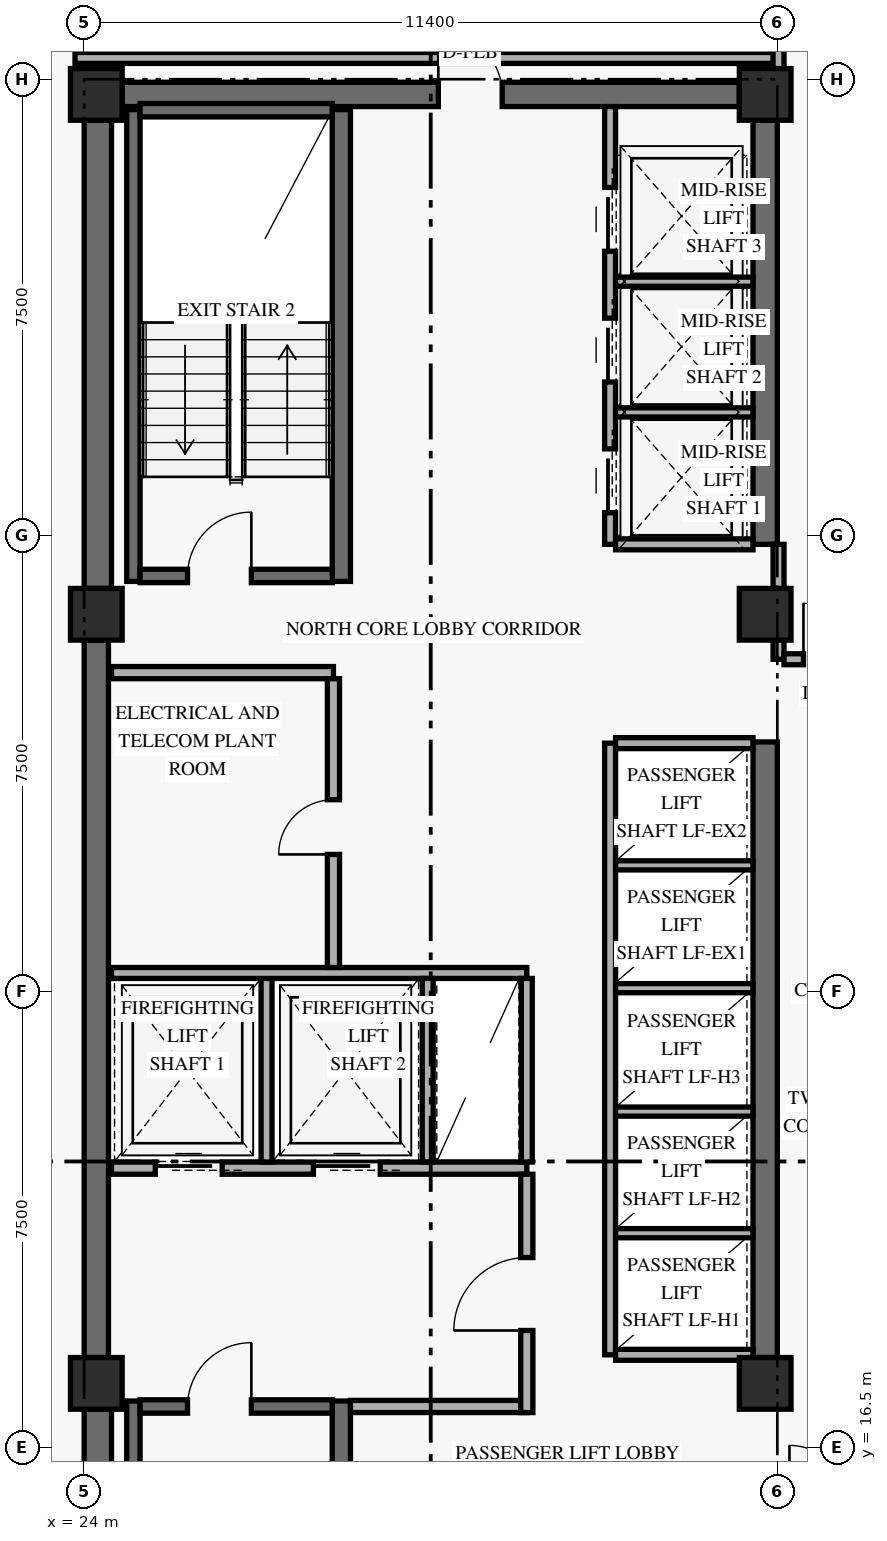
"""IFC4 building model, lengths in metres.
Left out: names, types, materials, properties, quantities, classifications, styles, units other than length and angle.
Written with IfcOpenShell. Run it as: python <this file> out.ifc"""

import sys

from ifc_helpers import new_model, si_unit, direction, frame, frame_2d, origin, origin_2d, place, context, subcontext, project, spatial, rectangle, extrude, element, fill, save


model = new_model("IFC4")
c1 = context("Model", 3, precision=1e-05, world=origin(), true_north=direction((0.0, 1.0)))
c2 = subcontext(c1, "Body", "Model", "MODEL_VIEW")
j1 = project(units=[si_unit("LENGTHUNIT", "METRE"), si_unit("PLANEANGLEUNIT", "RADIAN")], contexts=[c1])
p1 = place(None, origin())
s1 = spatial("IfcSite", under=j1, at=p1, CompositionType="ELEMENT")
p2 = place(p1, origin())
s2 = spatial("IfcBuilding", under=s1, at=p2, CompositionType="ELEMENT")
p3 = place(p2, frame((0.0, 0.0, 128.4)))
s3 = spatial("IfcBuildingStorey", under=s2, at=p3, CompositionType="ELEMENT", Elevation=128.4)
p4 = place(p3, frame((24.225, 9.675, 0.0), z_axis=(0.0, 0.0, 1.0), x_axis=(0.0, 1.0, 0.0)))
e1 = element("IfcWall", 1, at=p4, inside=s3, PredefinedType="SHEAR", context=c2, shape_type="SweptSolid", body=[
    extrude(rectangle(XDim=7.45, YDim=0.45, at=frame_2d((3.725, 0.0))), origin(), (0.0, 0.0, 1.0), 2.749),
])
p5 = place(p3, frame((24.2, 17.975, 0.0), z_axis=(0.0, 0.0, 1.0), x_axis=(0.0, 1.0, 0.0)))
e2 = element("IfcWall", 2, at=p5, inside=s3, PredefinedType="SHEAR", context=c2, shape_type="SweptSolid", body=[
    extrude(rectangle(XDim=11.8, YDim=0.4, at=frame_2d((5.9, 0.0))), origin(), (0.0, 0.0, 1.0), 2.749),
])
p6 = place(p3, frame((24.225, 30.625, 0.0), z_axis=(0.0, 0.0, 1.0), x_axis=(0.0, 1.0, 0.0)))
e3 = element("IfcWall", 3, at=p6, inside=s3, PredefinedType="SHEAR", context=c2, shape_type="SweptSolid", body=[
    extrude(rectangle(XDim=7.7, YDim=0.45, at=frame_2d((3.85, 0.0))), origin(), (0.0, 0.0, 1.0), 2.749),
])
p7 = place(p3, frame((35.2, 17.975, 0.0), z_axis=(0.0, 0.0, 1.0), x_axis=(0.0, 1.0, 0.0)))
e4 = element("IfcWall", 4, at=p7, inside=s3, PredefinedType="SHEAR", context=c2, shape_type="SweptSolid", body=[
    extrude(rectangle(XDim=10.125, YDim=0.4, at=frame_2d((5.062, 0.0))), origin(), (0.0, 0.0, 1.0), 2.749),
])
p8 = place(p3, frame((35.2, 31.35, 0.0), z_axis=(0.0, 0.0, 1.0), x_axis=(0.0, 1.0, 0.0)))
e5 = element("IfcWall", 5, at=p8, inside=s3, PredefinedType="SHEAR", context=c2, shape_type="SweptSolid", body=[
    extrude(rectangle(XDim=6.975, YDim=0.4, at=frame_2d((3.487, 0.0))), origin(), (0.0, 0.0, 1.0), 2.749),
])
p9 = place(p3, frame((24.625, 38.75, 0.0), z_axis=(0.0, 0.0, 1.0), x_axis=(1.0, 0.0, 0.0)))
e6 = element("IfcWall", 6, at=p9, inside=s3, PredefinedType="SHEAR", context=c2, shape_type="SweptSolid", body=[
    extrude(rectangle(XDim=10.15, YDim=0.4, at=frame_2d((5.075, 0.0))), origin(), (0.0, 0.0, 1.0), 3.36),
])
p10 = place(p9, frame((5.2, 0.0, 0.0)))
e7 = element("IfcOpeningElement", 7, at=p10, cuts=e6, PredefinedType="OPENING", context=c2, shape_type="SweptSolid", body=[
    extrude(rectangle(XDim=1.05, YDim=2.15, at=frame_2d((0.525, 1.075))), frame((0.0, 0.21, 0.0), z_axis=(0.0, -1.0, 0.0), x_axis=(1.0, 0.0, 0.0)), (0.0, 0.0, 1.0), 0.42),
])
p11 = place(p3, frame((24.81, 9.5, 0.0), z_axis=(0.0, 0.0, 1.0), x_axis=(0.0, 1.0, 0.0)))
e8 = element("IfcWall", 8, at=p11, inside=s3, PredefinedType="SHEAR", context=c2, shape_type="SweptSolid", body=[
    extrude(rectangle(XDim=7.76, YDim=0.22, at=frame_2d((3.88, 0.0))), origin(), (0.0, 0.0, 1.0), 3.36),
])
p12 = place(p3, frame((28.23, 9.5, 0.0), z_axis=(0.0, 0.0, 1.0), x_axis=(0.0, 1.0, 0.0)))
e9 = element("IfcWall", 9, at=p12, inside=s3, PredefinedType="SHEAR", context=c2, shape_type="SweptSolid", body=[
    extrude(rectangle(XDim=7.76, YDim=0.3, at=frame_2d((3.88, 0.0))), origin(), (0.0, 0.0, 1.0), 3.36),
])
p13 = place(p3, frame((24.92, 17.17, 0.0), z_axis=(0.0, 0.0, 1.0), x_axis=(1.0, 0.0, 0.0)))
e10 = element("IfcWall", 10, at=p13, inside=s3, PredefinedType="SHEAR", context=c2, shape_type="SweptSolid", body=[
    extrude(rectangle(XDim=3.16, YDim=0.22, at=frame_2d((1.58, 0.0))), origin(), (0.0, 0.0, 1.0), 3.36),
])
p14 = place(p13, frame((0.78, 0.0, 0.0)))
e11 = element("IfcOpeningElement", 11, at=p14, cuts=e10, PredefinedType="OPENING", context=c2, shape_type="SweptSolid", body=[
    extrude(rectangle(XDim=1.05, YDim=2.15, at=frame_2d((0.525, 1.075))), frame((0.0, 0.12, 0.0), z_axis=(0.0, -1.0, 0.0), x_axis=(1.0, 0.0, 0.0)), (0.0, 0.0, 1.0), 0.24),
])
p15 = place(p3, frame((24.81, 30.74, 0.0), z_axis=(0.0, 0.0, 1.0), x_axis=(0.0, 1.0, 0.0)))
e12 = element("IfcWall", 12, at=p15, inside=s3, PredefinedType="SHEAR", context=c2, shape_type="SweptSolid", body=[
    extrude(rectangle(XDim=7.76, YDim=0.22, at=frame_2d((3.88, 0.0))), origin(), (0.0, 0.0, 1.0), 3.36),
])
p16 = place(p3, frame((28.23, 30.74, 0.0), z_axis=(0.0, 0.0, 1.0), x_axis=(0.0, 1.0, 0.0)))
e13 = element("IfcWall", 13, at=p16, inside=s3, PredefinedType="SHEAR", context=c2, shape_type="SweptSolid", body=[
    extrude(rectangle(XDim=7.76, YDim=0.3, at=frame_2d((3.88, 0.0))), origin(), (0.0, 0.0, 1.0), 3.36),
])
p17 = place(p3, frame((24.92, 30.83, 0.0), z_axis=(0.0, 0.0, 1.0), x_axis=(1.0, 0.0, 0.0)))
e14 = element("IfcWall", 14, at=p17, inside=s3, PredefinedType="SHEAR", context=c2, shape_type="SweptSolid", body=[
    extrude(rectangle(XDim=3.16, YDim=0.22, at=frame_2d((1.58, 0.0))), origin(), (0.0, 0.0, 1.0), 3.36),
])
p18 = place(p17, frame((0.78, 0.0, 0.0)))
e15 = element("IfcOpeningElement", 15, at=p18, cuts=e14, PredefinedType="OPENING", context=c2, shape_type="SweptSolid", body=[
    extrude(rectangle(XDim=1.05, YDim=2.15, at=frame_2d((0.525, 1.075))), frame((0.0, 0.12, 0.0), z_axis=(0.0, -1.0, 0.0), x_axis=(1.0, 0.0, 0.0)), (0.0, 0.0, 1.0), 0.24),
])
p19 = place(p3, frame((24.92, 38.49, 0.0), z_axis=(0.0, 0.0, 1.0), x_axis=(1.0, 0.0, 0.0)))
e16 = element("IfcWall", 16, at=p19, inside=s3, PredefinedType="SHEAR", context=c2, shape_type="SweptSolid", body=[
    extrude(rectangle(XDim=3.16, YDim=0.22, at=frame_2d((1.58, 0.0))), origin(), (0.0, 0.0, 1.0), 3.36),
])
for number, where, z_axis, x_axis in (
    (17, (24.2, 17.55, 0.0), (0.0, 0.0, 1.0), (1.0, 0.0, 0.0)),
    (18, (24.2, 30.2, 0.0), (0.0, 0.0, 1.0), (1.0, 0.0, 0.0)),
    (19, (24.2, 38.75, 0.0), (0.0, 0.0, 1.0), (1.0, 0.0, 0.0)),
    (20, (35.2, 17.55, 0.0), (0.0, 0.0, 1.0), (1.0, 0.0, 0.0)),
    (21, (35.2, 30.2, 0.0), (0.0, 0.0, 1.0), (1.0, 0.0, 0.0)),
    (22, (35.2, 38.75, 0.0), (0.0, 0.0, 1.0), (1.0, 0.0, 0.0)),
):
    element("IfcColumn", number, at=place(p3, frame(where, z_axis=z_axis, x_axis=x_axis)), inside=s3, PredefinedType="COLUMN", context=c2, shape_type="SweptSolid", body=[
        extrude(rectangle(XDim=0.85, YDim=0.85, at=origin_2d()), origin(), (0.0, 0.0, 1.0), 3.6),
    ])
p20 = place(p3, frame((24.45, 21.09, 0.0), z_axis=(0.0, 0.0, 1.0), x_axis=(1.0, 0.0, 0.0)))
e23 = element("IfcWall", 23, at=p20, inside=s3, PredefinedType="STANDARD", context=c2, shape_type="SweptSolid", body=[
    extrude(rectangle(XDim=6.83, YDim=0.2, at=frame_2d((3.415, 0.0))), origin(), (0.0, 0.0, 1.0), 3.36),
])
p21 = place(p20, frame((0.72, 0.0, 0.0)))
e24 = element("IfcOpeningElement", 24, at=p21, cuts=e23, PredefinedType="OPENING", context=c2, shape_type="SweptSolid", body=[
    extrude(rectangle(XDim=1.1, YDim=2.2, at=frame_2d((0.55, 1.1))), frame((0.0, 0.11, 0.0), z_axis=(0.0, -1.0, 0.0), x_axis=(1.0, 0.0, 0.0)), (0.0, 0.0, 1.0), 0.22),
])
p22 = place(p20, frame((3.32, 0.0, 0.0)))
e25 = element("IfcOpeningElement", 25, at=p22, cuts=e23, PredefinedType="OPENING", context=c2, shape_type="SweptSolid", body=[
    extrude(rectangle(XDim=1.1, YDim=2.2, at=frame_2d((0.55, 1.1))), frame((0.0, 0.11, 0.0), z_axis=(0.0, -1.0, 0.0), x_axis=(1.0, 0.0, 0.0)), (0.0, 0.0, 1.0), 0.22),
])
p23 = place(p3, frame((28.38, 17.17, 0.0), z_axis=(0.0, 0.0, 1.0), x_axis=(1.0, 0.0, 0.0)))
e26 = element("IfcWall", 26, at=p23, inside=s3, PredefinedType="STANDARD", context=c2, shape_type="SweptSolid", body=[
    extrude(rectangle(XDim=2.9, YDim=0.2, at=frame_2d((1.45, 0.0))), origin(), (0.0, 0.0, 1.0), 3.36),
])
p24 = place(p3, frame((31.28, 17.07, 0.0), z_axis=(0.0, 0.0, 1.0), x_axis=(0.0, 1.0, 0.0)))
e27 = element("IfcWall", 27, at=p24, inside=s3, PredefinedType="STANDARD", context=c2, shape_type="SweptSolid", body=[
    extrude(rectangle(XDim=3.92, YDim=0.2, at=frame_2d((1.96, 0.0))), origin(), (0.0, 0.0, 1.0), 2.731),
])
p25 = place(p24, frame((1.35, 0.0, 0.0)))
e28 = element("IfcOpeningElement", 28, at=p25, cuts=e27, PredefinedType="OPENING", context=c2, shape_type="SweptSolid", body=[
    extrude(rectangle(XDim=1.2, YDim=2.15, at=frame_2d((0.6, 1.075))), frame((0.0, 0.11, 0.0), z_axis=(0.0, -1.0, 0.0), x_axis=(1.0, 0.0, 0.0)), (0.0, 0.0, 1.0), 0.22),
])
p26 = place(p3, frame((27.0, 21.19, 0.0), z_axis=(0.0, 0.0, 1.0), x_axis=(0.0, 1.0, 0.0)))
e29 = element("IfcWall", 29, at=p26, inside=s3, PredefinedType="STANDARD", context=c2, shape_type="SweptSolid", body=[
    extrude(rectangle(XDim=3.11, YDim=0.18, at=frame_2d((1.555, 0.0))), origin(), (0.0, 0.0, 1.0), 3.36),
])
p27 = place(p3, frame((24.45, 24.3, 0.0), z_axis=(0.0, 0.0, 1.0), x_axis=(1.0, 0.0, 0.0)))
e30 = element("IfcWall", 30, at=p27, inside=s3, PredefinedType="STANDARD", context=c2, shape_type="SweptSolid", body=[
    extrude(rectangle(XDim=6.83, YDim=0.18, at=frame_2d((3.415, 0.0))), origin(), (0.0, 0.0, 1.0), 3.36),
])
for number, where, z_axis, x_axis in (
    (31, (29.65, 21.19, 0.0), (0.0, 0.0, 1.0), (0.0, 1.0, 0.0)),
    (32, (31.28, 21.19, 0.0), (0.0, 0.0, 1.0), (0.0, 1.0, 0.0)),
):
    element("IfcWall", number, at=place(p3, frame(where, z_axis=z_axis, x_axis=x_axis)), inside=s3, PredefinedType="STANDARD", context=c2, shape_type="SweptSolid", body=[
        extrude(rectangle(XDim=3.02, YDim=0.18, at=frame_2d((1.51, 0.0))), origin(), (0.0, 0.0, 1.0), 3.36),
    ])
p28 = place(p3, frame((24.45, 29.24, 0.0), z_axis=(0.0, 0.0, 1.0), x_axis=(1.0, 0.0, 0.0)))
e33 = element("IfcWall", 33, at=p28, inside=s3, PredefinedType="STANDARD", context=c2, shape_type="SweptSolid", body=[
    extrude(rectangle(XDim=3.65, YDim=0.2, at=frame_2d((1.825, 0.0))), origin(), (0.0, 0.0, 1.0), 3.36),
])
p29 = place(p3, frame((28.1, 24.39, 0.0), z_axis=(0.0, 0.0, 1.0), x_axis=(0.0, 1.0, 0.0)))
e34 = element("IfcWall", 34, at=p29, inside=s3, PredefinedType="STANDARD", context=c2, shape_type="SweptSolid", body=[
    extrude(rectangle(XDim=4.75, YDim=0.2, at=frame_2d((2.375, 0.0))), origin(), (0.0, 0.0, 1.0), 3.36),
])
p30 = place(p29, frame((1.86, 0.0, 0.0)))
e35 = element("IfcOpeningElement", 35, at=p30, cuts=e34, PredefinedType="OPENING", context=c2, shape_type="SweptSolid", body=[
    extrude(rectangle(XDim=0.9, YDim=2.1, at=frame_2d((0.45, 1.05))), frame((0.0, 0.11, 0.0), z_axis=(0.0, -1.0, 0.0), x_axis=(1.0, 0.0, 0.0)), (0.0, 0.0, 1.0), 0.22),
])
p31 = place(p3, frame((32.65, 18.02, 0.0), z_axis=(0.0, 0.0, 1.0), x_axis=(0.0, 1.0, 0.0)))
e36 = element("IfcWall", 36, at=p31, inside=s3, PredefinedType="STANDARD", context=c2, shape_type="SweptSolid", body=[
    extrude(rectangle(XDim=10.06, YDim=0.18, at=frame_2d((5.03, 0.0))), origin(), (0.0, 0.0, 1.0), 3.36),
])
for number, where, z_axis, x_axis in (
    (37, (32.74, 18.02, 0.0), (0.0, 0.0, 1.0), (1.0, 0.0, 0.0)),
    (38, (32.74, 28.08, 0.0), (0.0, 0.0, 1.0), (1.0, 0.0, 0.0)),
):
    element("IfcWall", number, at=place(p3, frame(where, z_axis=z_axis, x_axis=x_axis)), inside=s3, PredefinedType="STANDARD", context=c2, shape_type="SweptSolid", body=[
        extrude(rectangle(XDim=2.26, YDim=0.18, at=frame_2d((1.13, 0.0))), origin(), (0.0, 0.0, 1.0), 3.36),
    ])
for number, where, z_axis, x_axis in (
    (39, (32.74, 20.02, 0.0), (0.0, 0.0, 1.0), (1.0, 0.0, 0.0)),
    (40, (32.74, 22.02, 0.0), (0.0, 0.0, 1.0), (1.0, 0.0, 0.0)),
    (41, (32.74, 24.05, 0.0), (0.0, 0.0, 1.0), (1.0, 0.0, 0.0)),
    (42, (32.74, 26.07, 0.0), (0.0, 0.0, 1.0), (1.0, 0.0, 0.0)),
):
    element("IfcWall", number, at=place(p3, frame(where, z_axis=z_axis, x_axis=x_axis)), inside=s3, PredefinedType="STANDARD", context=c2, shape_type="SweptSolid", body=[
        extrude(rectangle(XDim=2.26, YDim=0.15, at=frame_2d((1.13, 0.0))), origin(), (0.0, 0.0, 1.0), 3.36),
    ])
p32 = place(p3, frame((32.65, 31.35, 0.0), z_axis=(0.0, 0.0, 1.0), x_axis=(0.0, 1.0, 0.0)))
e43 = element("IfcWall", 43, at=p32, inside=s3, PredefinedType="STANDARD", context=c2, shape_type="SweptSolid", body=[
    extrude(rectangle(XDim=7.2, YDim=0.18, at=frame_2d((3.6, 0.0))), origin(), (0.0, 0.0, 1.0), 3.36),
])
p33 = place(p32, frame((0.52, 0.0, 0.0)))
e44 = element("IfcOpeningElement", 44, at=p33, cuts=e43, PredefinedType="OPENING", context=c2, shape_type="SweptSolid", body=[
    extrude(rectangle(XDim=1.05, YDim=2.2, at=frame_2d((0.525, 1.1))), frame((0.0, 0.1, 0.0), z_axis=(0.0, -1.0, 0.0), x_axis=(1.0, 0.0, 0.0)), (0.0, 0.0, 1.0), 0.2),
])
p34 = place(p32, frame((2.67, 0.0, 0.0)))
e45 = element("IfcOpeningElement", 45, at=p34, cuts=e43, PredefinedType="OPENING", context=c2, shape_type="SweptSolid", body=[
    extrude(rectangle(XDim=1.05, YDim=2.2, at=frame_2d((0.525, 1.1))), frame((0.0, 0.1, 0.0), z_axis=(0.0, -1.0, 0.0), x_axis=(1.0, 0.0, 0.0)), (0.0, 0.0, 1.0), 0.2),
])
p35 = place(p32, frame((4.82, 0.0, 0.0)))
e46 = element("IfcOpeningElement", 46, at=p35, cuts=e43, PredefinedType="OPENING", context=c2, shape_type="SweptSolid", body=[
    extrude(rectangle(XDim=1.05, YDim=2.2, at=frame_2d((0.525, 1.1))), frame((0.0, 0.1, 0.0), z_axis=(0.0, -1.0, 0.0), x_axis=(1.0, 0.0, 0.0)), (0.0, 0.0, 1.0), 0.2),
])
p36 = place(p3, frame((32.74, 31.35, 0.0), z_axis=(0.0, 0.0, 1.0), x_axis=(1.0, 0.0, 0.0)))
e47 = element("IfcWall", 47, at=p36, inside=s3, PredefinedType="STANDARD", context=c2, shape_type="SweptSolid", body=[
    extrude(rectangle(XDim=2.26, YDim=0.18, at=frame_2d((1.13, 0.0))), origin(), (0.0, 0.0, 1.0), 3.36),
])
for number, where, z_axis, x_axis in (
    (48, (32.74, 33.52, 0.0), (0.0, 0.0, 1.0), (1.0, 0.0, 0.0)),
    (49, (32.74, 35.67, 0.0), (0.0, 0.0, 1.0), (1.0, 0.0, 0.0)),
):
    element("IfcWall", number, at=place(p3, frame(where, z_axis=z_axis, x_axis=x_axis)), inside=s3, PredefinedType="STANDARD", context=c2, shape_type="SweptSolid", body=[
        extrude(rectangle(XDim=2.26, YDim=0.15, at=frame_2d((1.13, 0.0))), origin(), (0.0, 0.0, 1.0), 3.36),
    ])
p37 = place(p3, frame((35.42, 29.46, 0.0), z_axis=(0.0, 0.0, 1.0), x_axis=(0.0, 1.0, 0.0)))
e50 = element("IfcWall", 50, at=p37, inside=s3, PredefinedType="STANDARD", context=c2, shape_type="SweptSolid", body=[
    extrude(rectangle(XDim=1.89, YDim=0.18, at=frame_2d((0.945, 0.0))), origin(), (0.0, 0.0, 1.0), 2.731),
])
p38 = place(p3, frame((35.51, 29.46, 0.0), z_axis=(0.0, 0.0, 1.0), x_axis=(1.0, 0.0, 0.0)))
e51 = element("IfcWall", 51, at=p38, inside=s3, PredefinedType="STANDARD", context=c2, shape_type="SweptSolid", body=[
    extrude(rectangle(XDim=11.69, YDim=0.18, at=frame_2d((5.845, 0.0))), origin(), (0.0, 0.0, 1.0), 2.731),
])
p39 = place(p38, frame((0.32, 0.0, 0.0)))
e52 = element("IfcOpeningElement", 52, at=p39, cuts=e51, PredefinedType="OPENING", context=c2, shape_type="SweptSolid", body=[
    extrude(rectangle(XDim=0.92, YDim=2.15, at=frame_2d((0.46, 1.075))), frame((0.0, 0.1, 0.0), z_axis=(0.0, -1.0, 0.0), x_axis=(1.0, 0.0, 0.0)), (0.0, 0.0, 1.0), 0.2),
])
p40 = place(p3, frame((23.85, 39.35, 0.0), z_axis=(0.0, 0.0, 1.0), x_axis=(1.0, 0.0, 0.0)))
e53 = element("IfcWall", 53, at=p40, inside=s3, PredefinedType="STANDARD", context=c2, shape_type="SweptSolid", body=[
    extrude(rectangle(XDim=11.57, YDim=0.18, at=frame_2d((5.785, 0.0))), origin(), (0.0, 0.0, 1.0), 2.731),
])
p41 = place(p3, frame((35.42, 38.75, 0.0), z_axis=(0.0, 0.0, 1.0), x_axis=(0.0, 1.0, 0.0)))
e54 = element("IfcWall", 54, at=p41, inside=s3, PredefinedType="PARTITIONING", context=c2, shape_type="SweptSolid", body=[
    extrude(rectangle(XDim=6.27, YDim=0.18, at=frame_2d((3.135, 0.0))), origin(), (0.0, 0.0, 1.0), 2.731),
])
p42 = place(p14, frame((1.05, 0.0, 0.0), z_axis=(0.0, 0.0, 1.0), x_axis=(-1.0, 0.0, 0.0)))
e55 = element("IfcDoor", 55, at=p42, inside=s3, OperationType="SINGLE_SWING_LEFT", PredefinedType="DOOR", context=c2, shape_type="SweptSolid", body=[
    extrude(rectangle(XDim=1.05, YDim=2.15, at=frame_2d((0.525, 1.075))), frame((0.0, 0.025, 0.0), z_axis=(0.0, -1.0, 0.0), x_axis=(1.0, 0.0, 0.0)), (0.0, 0.0, 1.0), 0.05),
])
fill(e11, e55)
p43 = place(p18, origin())
e56 = element("IfcDoor", 56, at=p43, inside=s3, OperationType="SINGLE_SWING_RIGHT", PredefinedType="DOOR", context=c2, shape_type="SweptSolid", body=[
    extrude(rectangle(XDim=1.05, YDim=2.15, at=frame_2d((0.525, 1.075))), frame((0.0, 0.025, 0.0), z_axis=(0.0, -1.0, 0.0), x_axis=(1.0, 0.0, 0.0)), (0.0, 0.0, 1.0), 0.05),
])
fill(e15, e56)
p44 = place(p21, origin())
e57 = element("IfcDoor", 57, at=p44, inside=s3, OperationType="SLIDING_TO_LEFT", PredefinedType="DOOR", context=c2, shape_type="SweptSolid", body=[
    extrude(rectangle(XDim=1.1, YDim=2.2, at=frame_2d((0.55, 1.1))), frame((0.0, 0.025, 0.0), z_axis=(0.0, -1.0, 0.0), x_axis=(1.0, 0.0, 0.0)), (0.0, 0.0, 1.0), 0.05),
])
fill(e24, e57)
p45 = place(p22, origin())
e58 = element("IfcDoor", 58, at=p45, inside=s3, OperationType="SLIDING_TO_LEFT", PredefinedType="DOOR", context=c2, shape_type="SweptSolid", body=[
    extrude(rectangle(XDim=1.1, YDim=2.2, at=frame_2d((0.55, 1.1))), frame((0.0, 0.025, 0.0), z_axis=(0.0, -1.0, 0.0), x_axis=(1.0, 0.0, 0.0)), (0.0, 0.0, 1.0), 0.05),
])
fill(e25, e58)
p46 = place(p25, origin())
e59 = element("IfcDoor", 59, at=p46, inside=s3, OperationType="SINGLE_SWING_LEFT", PredefinedType="DOOR", context=c2, shape_type="SweptSolid", body=[
    extrude(rectangle(XDim=1.2, YDim=2.15, at=frame_2d((0.6, 1.075))), frame((0.0, 0.025, 0.0), z_axis=(0.0, -1.0, 0.0), x_axis=(1.0, 0.0, 0.0)), (0.0, 0.0, 1.0), 0.05),
])
fill(e28, e59)
p47 = place(p30, origin())
e60 = element("IfcDoor", 60, at=p47, inside=s3, OperationType="SINGLE_SWING_LEFT", PredefinedType="DOOR", context=c2, shape_type="SweptSolid", body=[
    extrude(rectangle(XDim=0.9, YDim=2.1, at=frame_2d((0.45, 1.05))), frame((0.0, 0.025, 0.0), z_axis=(0.0, -1.0, 0.0), x_axis=(1.0, 0.0, 0.0)), (0.0, 0.0, 1.0), 0.05),
])
fill(e35, e60)
p48 = place(p33, origin())
e61 = element("IfcDoor", 61, at=p48, inside=s3, OperationType="SLIDING_TO_LEFT", PredefinedType="DOOR", context=c2, shape_type="SweptSolid", body=[
    extrude(rectangle(XDim=1.05, YDim=2.2, at=frame_2d((0.525, 1.1))), frame((0.0, 0.025, 0.0), z_axis=(0.0, -1.0, 0.0), x_axis=(1.0, 0.0, 0.0)), (0.0, 0.0, 1.0), 0.05),
])
fill(e44, e61)
p49 = place(p34, origin())
e62 = element("IfcDoor", 62, at=p49, inside=s3, OperationType="SLIDING_TO_LEFT", PredefinedType="DOOR", context=c2, shape_type="SweptSolid", body=[
    extrude(rectangle(XDim=1.05, YDim=2.2, at=frame_2d((0.525, 1.1))), frame((0.0, 0.025, 0.0), z_axis=(0.0, -1.0, 0.0), x_axis=(1.0, 0.0, 0.0)), (0.0, 0.0, 1.0), 0.05),
])
fill(e45, e62)
p50 = place(p35, origin())
e63 = element("IfcDoor", 63, at=p50, inside=s3, OperationType="SLIDING_TO_LEFT", PredefinedType="DOOR", context=c2, shape_type="SweptSolid", body=[
    extrude(rectangle(XDim=1.05, YDim=2.2, at=frame_2d((0.525, 1.1))), frame((0.0, 0.025, 0.0), z_axis=(0.0, -1.0, 0.0), x_axis=(1.0, 0.0, 0.0)), (0.0, 0.0, 1.0), 0.05),
])
fill(e46, e63)
p51 = place(p10, frame((1.05, 0.0, 0.0), z_axis=(0.0, 0.0, 1.0), x_axis=(-1.0, 0.0, 0.0)))
e64 = element("IfcDoor", 64, at=p51, inside=s3, OperationType="SINGLE_SWING_RIGHT", PredefinedType="DOOR", context=c2, shape_type="SweptSolid", body=[
    extrude(rectangle(XDim=1.05, YDim=2.15, at=frame_2d((0.525, 1.075))), frame((0.0, 0.025, 0.0), z_axis=(0.0, -1.0, 0.0), x_axis=(1.0, 0.0, 0.0)), (0.0, 0.0, 1.0), 0.05),
])
fill(e7, e64)
p52 = place(p39, origin())
e65 = element("IfcDoor", 65, at=p52, inside=s3, OperationType="SINGLE_SWING_LEFT", PredefinedType="DOOR", context=c2, shape_type="SweptSolid", body=[
    extrude(rectangle(XDim=0.92, YDim=2.15, at=frame_2d((0.46, 1.075))), frame((0.0, 0.025, 0.0), z_axis=(0.0, -1.0, 0.0), x_axis=(1.0, 0.0, 0.0)), (0.0, 0.0, 1.0), 0.05),
])
fill(e52, e65)
save(model, sys.argv[1])
